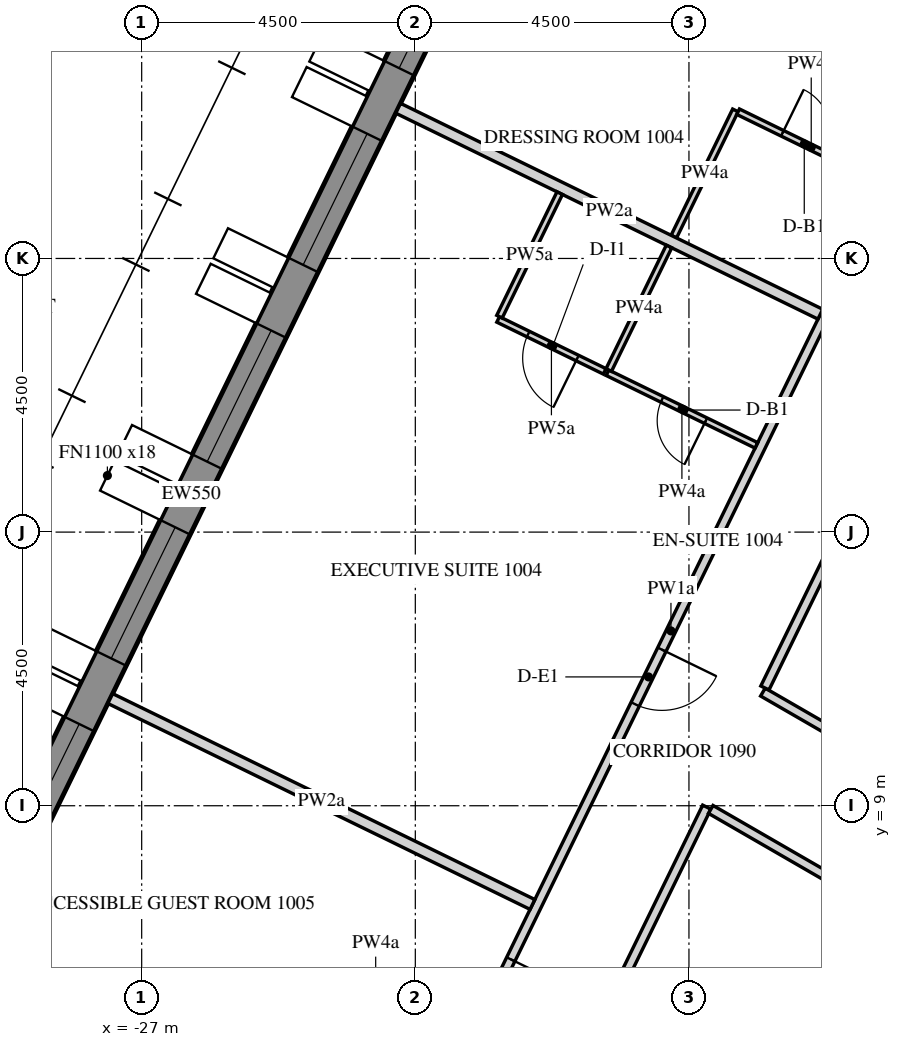
"""IFC4 building model, lengths in metres.
Left out: names, types, materials, properties, quantities, classifications, styles, units other than length and angle.
Written with IfcOpenShell. Run it as: python <this file> out.ifc"""

import sys

from ifc_helpers import new_model, si_unit, direction, frame, frame_2d, origin, place, context, subcontext, project, spatial, polyline, rectangle, outline, extrude, element, fill, save


model = new_model("IFC4")
c1 = context("Model", 3, precision=1e-05, world=origin(), true_north=direction((0.0, 1.0)))
c2 = subcontext(c1, "Body", "Model", "MODEL_VIEW")
j1 = project(units=[si_unit("LENGTHUNIT", "METRE"), si_unit("PLANEANGLEUNIT", "RADIAN")], contexts=[c1])
p1 = place(None, origin())
s1 = spatial("IfcSite", under=j1, at=p1, CompositionType="ELEMENT")
p2 = place(p1, origin())
s2 = spatial("IfcBuilding", under=s1, at=p2, CompositionType="ELEMENT")
p3 = place(p2, frame((0.0, 0.0, 135.0)))
s3 = spatial("IfcBuildingStorey", under=s2, at=p3, CompositionType="ELEMENT", Elevation=135.0)
p4 = place(p3, frame((-19.595, 27.633, -0.15), z_axis=(0.0, 0.0, 1.0), x_axis=(-0.438368285794, -0.898795441694, 0.0)))
e1 = element("IfcWall", 1, at=p4, inside=s3, PredefinedType="SOLIDWALL", context=c2, shape_type="SweptSolid", body=[
    extrude(outline(polyline([(-0.026, -0.275), (30.093, -0.275), (30.048, 0.275), (0.026, 0.275), (-0.026, -0.275)])), origin(), (0.0, 0.0, 1.0), 3.9),
])
p5 = place(p4, frame((1.236, 0.0, 1.05)))
e2 = element("IfcOpeningElement", 2, at=p5, cuts=e1, PredefinedType="OPENING", context=c2, shape_type="SweptSolid", body=[
    extrude(rectangle(XDim=2.4, YDim=2.4, at=frame_2d((1.2, 1.2))), frame((0.0, 0.285, 0.0), z_axis=(0.0, -1.0, 0.0), x_axis=(1.0, 0.0, 0.0)), (0.0, 0.0, 1.0), 0.57),
])
p6 = place(p4, frame((4.835, 0.0, 1.05)))
e3 = element("IfcOpeningElement", 3, at=p6, cuts=e1, PredefinedType="OPENING", context=c2, shape_type="SweptSolid", body=[
    extrude(rectangle(XDim=2.4, YDim=2.4, at=frame_2d((1.2, 1.2))), frame((0.0, 0.285, 0.0), z_axis=(0.0, -1.0, 0.0), x_axis=(1.0, 0.0, 0.0)), (0.0, 0.0, 1.0), 0.57),
])
p7 = place(p4, frame((8.436, 0.0, 1.05)))
e4 = element("IfcOpeningElement", 4, at=p7, cuts=e1, PredefinedType="OPENING", context=c2, shape_type="SweptSolid", body=[
    extrude(rectangle(XDim=2.4, YDim=2.4, at=frame_2d((1.2, 1.2))), frame((0.0, 0.285, 0.0), z_axis=(0.0, -1.0, 0.0), x_axis=(1.0, 0.0, 0.0)), (0.0, 0.0, 1.0), 0.57),
])
p8 = place(p4, frame((12.035, 0.0, 1.05)))
e5 = element("IfcOpeningElement", 5, at=p8, cuts=e1, PredefinedType="OPENING", context=c2, shape_type="SweptSolid", body=[
    extrude(rectangle(XDim=2.4, YDim=2.4, at=frame_2d((1.2, 1.2))), frame((0.0, 0.285, 0.0), z_axis=(0.0, -1.0, 0.0), x_axis=(1.0, 0.0, 0.0)), (0.0, 0.0, 1.0), 0.57),
])
p9 = place(p4, frame((15.635, 0.0, 1.05)))
e6 = element("IfcOpeningElement", 6, at=p9, cuts=e1, PredefinedType="OPENING", context=c2, shape_type="SweptSolid", body=[
    extrude(rectangle(XDim=2.4, YDim=2.4, at=frame_2d((1.2, 1.2))), frame((0.0, 0.285, 0.0), z_axis=(0.0, -1.0, 0.0), x_axis=(1.0, 0.0, 0.0)), (0.0, 0.0, 1.0), 0.57),
])
p10 = place(p4, frame((19.236, 0.0, 1.05)))
e7 = element("IfcOpeningElement", 7, at=p10, cuts=e1, PredefinedType="OPENING", context=c2, shape_type="SweptSolid", body=[
    extrude(rectangle(XDim=2.4, YDim=2.4, at=frame_2d((1.2, 1.2))), frame((0.0, 0.285, 0.0), z_axis=(0.0, -1.0, 0.0), x_axis=(1.0, 0.0, 0.0)), (0.0, 0.0, 1.0), 0.57),
])
p11 = place(p4, frame((22.835, 0.0, 1.05)))
e8 = element("IfcOpeningElement", 8, at=p11, cuts=e1, PredefinedType="OPENING", context=c2, shape_type="SweptSolid", body=[
    extrude(rectangle(XDim=2.4, YDim=2.4, at=frame_2d((1.2, 1.2))), frame((0.0, 0.285, 0.0), z_axis=(0.0, -1.0, 0.0), x_axis=(1.0, 0.0, 0.0)), (0.0, 0.0, 1.0), 0.57),
])
p12 = place(p4, frame((26.436, 0.0, 1.05)))
e9 = element("IfcOpeningElement", 9, at=p12, cuts=e1, PredefinedType="OPENING", context=c2, shape_type="SweptSolid", body=[
    extrude(rectangle(XDim=2.4, YDim=2.4, at=frame_2d((1.2, 1.2))), frame((0.0, 0.285, 0.0), z_axis=(0.0, -1.0, 0.0), x_axis=(1.0, 0.0, 0.0)), (0.0, 0.0, 1.0), 0.57),
])
p13 = place(p3, frame((-7.91, 13.7, -0.15), z_axis=(0.0, 0.0, 1.0), x_axis=(-0.499999880136, -0.866025472988, 0.0)))
e10 = element("IfcWall", 10, at=p13, inside=s3, PredefinedType="SHEAR", context=c2, shape_type="SweptSolid", body=[
    extrude(outline(polyline([(-0.173, -0.3), (15.993, -0.3), (15.646, 0.3), (0.173, 0.3), (-0.173, -0.3)])), origin(), (0.0, 0.0, 1.0), 3.9),
])
p14 = place(p13, frame((7.039, 0.0, 0.15)))
e11 = element("IfcOpeningElement", 11, at=p14, cuts=e10, PredefinedType="OPENING", context=c2, shape_type="SweptSolid", body=[
    extrude(rectangle(XDim=1.8, YDim=2.4, at=frame_2d((0.9, 1.2))), frame((0.0, 0.31, 0.0), z_axis=(0.0, -1.0, 0.0), x_axis=(1.0, 0.0, 0.0)), (0.0, 0.0, 1.0), 0.62),
])
p15 = place(p3, frame((-13.565, 21.575, 0.0), z_axis=(0.0, 0.0, 1.0), x_axis=(-0.438378393111, -0.898790511996, 0.0)))
e12 = element("IfcWall", 12, at=p15, inside=s3, PredefinedType="PARTITIONING", context=c2, shape_type="SweptSolid", body=[
    extrude(rectangle(XDim=21.584, YDim=0.15, at=frame_2d((10.792, 0.0))), origin(), (0.0, 0.0, 1.0), 2.838),
])
p16 = place(p15, frame((0.775, 0.0, 0.0)))
e13 = element("IfcOpeningElement", 13, at=p16, cuts=e12, PredefinedType="OPENING", context=c2, shape_type="SweptSolid", body=[
    extrude(rectangle(XDim=1.0, YDim=2.1, at=frame_2d((0.5, 1.05))), frame((0.0, 0.085, 0.0), z_axis=(0.0, -1.0, 0.0), x_axis=(1.0, 0.0, 0.0)), (0.0, 0.0, 1.0), 0.17),
])
p17 = place(p15, frame((11.134, 0.0, 0.0)))
e14 = element("IfcOpeningElement", 14, at=p17, cuts=e12, PredefinedType="OPENING", context=c2, shape_type="SweptSolid", body=[
    extrude(rectangle(XDim=1.0, YDim=2.1, at=frame_2d((0.5, 1.05))), frame((0.0, 0.085, 0.0), z_axis=(0.0, -1.0, 0.0), x_axis=(1.0, 0.0, 0.0)), (0.0, 0.0, 1.0), 0.17),
])
p18 = place(p15, frame((16.801, 0.0, 0.0)))
e15 = element("IfcOpeningElement", 15, at=p18, cuts=e12, PredefinedType="OPENING", context=c2, shape_type="SweptSolid", body=[
    extrude(rectangle(XDim=1.0, YDim=2.1, at=frame_2d((0.5, 1.05))), frame((0.0, 0.085, 0.0), z_axis=(0.0, -1.0, 0.0), x_axis=(1.0, 0.0, 0.0)), (0.0, 0.0, 1.0), 0.17),
])
p19 = place(p3, frame((-11.614, 7.884, 0.0), z_axis=(0.0, 0.0, 1.0), x_axis=(-0.866017375886, 0.50001390447, 0.0)))
e16 = element("IfcWall", 16, at=p19, inside=s3, PredefinedType="PARTITIONING", context=c2, shape_type="SweptSolid", body=[
    extrude(rectangle(XDim=5.97, YDim=0.15, at=frame_2d((2.985, 0.0))), origin(), (0.0, 0.0, 1.0), 2.838),
])
p20 = place(p3, frame((-16.751, 10.937, 0.0), z_axis=(0.0, 0.0, 1.0), x_axis=(0.438378523504, 0.898790448397, 0.0)))
e17 = element("IfcWall", 17, at=p20, inside=s3, PredefinedType="PARTITIONING", context=c2, shape_type="SweptSolid", body=[
    extrude(rectangle(XDim=9.917, YDim=0.15, at=frame_2d((4.958, 0.0))), origin(), (0.0, 0.0, 1.0), 2.838),
])
p21 = place(p3, frame((-21.885, 0.41, 0.0), z_axis=(0.0, 0.0, 1.0), x_axis=(0.43837064471, 0.898794291179, 0.0)))
e18 = element("IfcWall", 18, at=p21, inside=s3, PredefinedType="PARTITIONING", context=c2, shape_type="SweptSolid", body=[
    extrude(rectangle(XDim=9.532, YDim=0.15, at=frame_2d((4.766, 0.0))), origin(), (0.0, 0.0, 1.0), 2.838),
])
p22 = place(p21, frame((4.316, 0.0, 0.0)))
e19 = element("IfcOpeningElement", 19, at=p22, cuts=e18, PredefinedType="OPENING", context=c2, shape_type="SweptSolid", body=[
    extrude(rectangle(XDim=0.9, YDim=2.1, at=frame_2d((0.45, 1.05))), frame((0.0, 0.085, 0.0), z_axis=(0.0, -1.0, 0.0), x_axis=(1.0, 0.0, 0.0)), (0.0, 0.0, 1.0), 0.17),
])
p23 = place(p3, frame((-17.642, 8.94, 0.0), z_axis=(0.0, 0.0, 1.0), x_axis=(0.866017948234, -0.500012913169, 0.0)))
e20 = element("IfcWall", 20, at=p23, inside=s3, PredefinedType="PARTITIONING", context=c2, shape_type="SweptSolid", body=[
    extrude(rectangle(XDim=5.748, YDim=0.15, at=frame_2d((2.874, 0.0))), origin(), (0.0, 0.0, 1.0), 2.838),
])
p24 = place(p3, frame((-18.249, 18.359, 0.0), z_axis=(0.0, 0.0, 1.0), x_axis=(0.438313261974, 0.898822276303, 0.0)))
e21 = element("IfcWall", 21, at=p24, inside=s3, PredefinedType="PARTITIONING", context=c2, shape_type="SweptSolid", body=[
    extrude(rectangle(XDim=2.31, YDim=0.1, at=frame_2d((1.155, 0.0))), origin(), (0.0, 0.0, 1.0), 2.838),
])
p25 = place(p3, frame((-17.191, 20.413, 0.0), z_axis=(0.0, 0.0, 1.0), x_axis=(0.898800897694, -0.438357099068, 0.0)))
e22 = element("IfcWall", 22, at=p25, inside=s3, PredefinedType="PARTITIONING", context=c2, shape_type="SweptSolid", body=[
    extrude(rectangle(XDim=2.675, YDim=0.1, at=frame_2d((1.337, 0.0))), origin(), (0.0, 0.0, 1.0), 2.838),
])
p26 = place(p25, frame((0.81, 0.0, 0.0)))
e23 = element("IfcOpeningElement", 23, at=p26, cuts=e22, PredefinedType="OPENING", context=c2, shape_type="SweptSolid", body=[
    extrude(rectangle(XDim=0.8, YDim=2.1, at=frame_2d((0.4, 1.05))), frame((0.0, 0.06, 0.0), z_axis=(0.0, -1.0, 0.0), x_axis=(1.0, 0.0, 0.0)), (0.0, 0.0, 1.0), 0.12),
])
p27 = place(p3, frame((-22.782, 20.47, 0.0), z_axis=(0.0, 0.0, 1.0), x_axis=(0.898789402655, -0.438380667542, 0.0)))
e24 = element("IfcWall", 24, at=p27, inside=s3, PredefinedType="PARTITIONING", context=c2, shape_type="SweptSolid", body=[
    extrude(rectangle(XDim=7.725, YDim=0.18, at=frame_2d((3.862, 0.0))), origin(), (0.0, 0.0, 1.0), 2.838),
])
p28 = place(p3, frame((-16.891, 14.926, 0.0), z_axis=(0.0, 0.0, 1.0), x_axis=(-0.898791692788, 0.43837597217, 0.0)))
e25 = element("IfcWall", 25, at=p28, inside=s3, PredefinedType="PARTITIONING", context=c2, shape_type="SweptSolid", body=[
    extrude(rectangle(XDim=2.725, YDim=0.1, at=frame_2d((1.363, 0.0))), origin(), (0.0, 0.0, 1.0), 2.838),
])
p29 = place(p28, frame((0.925, 0.0, 0.0)))
e26 = element("IfcOpeningElement", 26, at=p29, cuts=e25, PredefinedType="OPENING", context=c2, shape_type="SweptSolid", body=[
    extrude(rectangle(XDim=0.8, YDim=2.1, at=frame_2d((0.4, 1.05))), frame((0.0, 0.06, 0.0), z_axis=(0.0, -1.0, 0.0), x_axis=(1.0, 0.0, 0.0)), (0.0, 0.0, 1.0), 0.12),
])
p30 = place(p3, frame((-19.385, 16.143, 0.0), z_axis=(0.0, 0.0, 1.0), x_axis=(-0.898815368173, 0.438327427772, 0.0)))
e27 = element("IfcWall", 27, at=p30, inside=s3, PredefinedType="PARTITIONING", context=c2, shape_type="SweptSolid", body=[
    extrude(rectangle(XDim=1.95, YDim=0.1, at=frame_2d((0.975, 0.0))), origin(), (0.0, 0.0, 1.0), 2.838),
])
p31 = place(p30, frame((0.5, 0.0, 0.0)))
e28 = element("IfcOpeningElement", 28, at=p31, cuts=e27, PredefinedType="OPENING", context=c2, shape_type="SweptSolid", body=[
    extrude(rectangle(XDim=0.9, YDim=2.1, at=frame_2d((0.45, 1.05))), frame((0.0, 0.06, 0.0), z_axis=(0.0, -1.0, 0.0), x_axis=(1.0, 0.0, 0.0)), (0.0, 0.0, 1.0), 0.12),
])
p32 = place(p3, frame((-21.116, 17.042, 0.0), z_axis=(0.0, 0.0, 1.0), x_axis=(0.438334246956, 0.898812042613, 0.0)))
e29 = element("IfcWall", 29, at=p32, inside=s3, PredefinedType="PARTITIONING", context=c2, shape_type="SweptSolid", body=[
    extrude(rectangle(XDim=2.26, YDim=0.1, at=frame_2d((1.13, 0.0))), origin(), (0.0, 0.0, 1.0), 2.838),
])
p33 = place(p3, frame((-27.517, 10.763, 0.0), z_axis=(0.0, 0.0, 1.0), x_axis=(0.898789402655, -0.438380667542, 0.0)))
e30 = element("IfcWall", 30, at=p33, inside=s3, PredefinedType="PARTITIONING", context=c2, shape_type="SweptSolid", body=[
    extrude(rectangle(XDim=7.725, YDim=0.18, at=frame_2d((3.862, 0.0))), origin(), (0.0, 0.0, 1.0), 2.838),
])
p34 = place(p3, frame((-18.328, 18.197, 0.0), z_axis=(0.0, 0.0, 1.0), x_axis=(-0.438376807268, -0.898791285477, 0.0)))
e31 = element("IfcWall", 31, at=p34, inside=s3, PredefinedType="PARTITIONING", context=c2, shape_type="SweptSolid", body=[
    extrude(rectangle(XDim=2.26, YDim=0.1, at=frame_2d((1.13, 0.0))), origin(), (0.0, 0.0, 1.0), 2.838),
])
p35 = place(p6, frame((0.0, 0.205, 0.0)))
e32 = element("IfcWindow", 32, at=p35, inside=s3, PartitioningType="DOUBLE_PANEL_VERTICAL", PredefinedType="WINDOW", context=c2, shape_type="SweptSolid", body=[
    extrude(rectangle(XDim=2.4, YDim=2.4, at=frame_2d((1.2, 1.2))), frame((0.0, 0.03, 0.0), z_axis=(0.0, -1.0, 0.0), x_axis=(1.0, 0.0, 0.0)), (0.0, 0.0, 1.0), 0.06),
])
fill(e3, e32)
p36 = place(p7, frame((0.0, 0.205, 0.0)))
e33 = element("IfcWindow", 33, at=p36, inside=s3, PartitioningType="DOUBLE_PANEL_VERTICAL", PredefinedType="WINDOW", context=c2, shape_type="SweptSolid", body=[
    extrude(rectangle(XDim=2.4, YDim=2.4, at=frame_2d((1.2, 1.2))), frame((0.0, 0.03, 0.0), z_axis=(0.0, -1.0, 0.0), x_axis=(1.0, 0.0, 0.0)), (0.0, 0.0, 1.0), 0.06),
])
fill(e4, e33)
p37 = place(p8, frame((0.0, 0.205, 0.0)))
e34 = element("IfcWindow", 34, at=p37, inside=s3, PartitioningType="DOUBLE_PANEL_VERTICAL", PredefinedType="WINDOW", context=c2, shape_type="SweptSolid", body=[
    extrude(rectangle(XDim=2.4, YDim=2.4, at=frame_2d((1.2, 1.2))), frame((0.0, 0.03, 0.0), z_axis=(0.0, -1.0, 0.0), x_axis=(1.0, 0.0, 0.0)), (0.0, 0.0, 1.0), 0.06),
])
fill(e5, e34)
p38 = place(p9, frame((0.0, 0.205, 0.0)))
e35 = element("IfcWindow", 35, at=p38, inside=s3, PartitioningType="DOUBLE_PANEL_VERTICAL", PredefinedType="WINDOW", context=c2, shape_type="SweptSolid", body=[
    extrude(rectangle(XDim=2.4, YDim=2.4, at=frame_2d((1.2, 1.2))), frame((0.0, 0.03, 0.0), z_axis=(0.0, -1.0, 0.0), x_axis=(1.0, 0.0, 0.0)), (0.0, 0.0, 1.0), 0.06),
])
fill(e6, e35)
p39 = place(p10, frame((0.0, 0.205, 0.0)))
e36 = element("IfcWindow", 36, at=p39, inside=s3, PartitioningType="DOUBLE_PANEL_VERTICAL", PredefinedType="WINDOW", context=c2, shape_type="SweptSolid", body=[
    extrude(rectangle(XDim=2.4, YDim=2.4, at=frame_2d((1.2, 1.2))), frame((0.0, 0.03, 0.0), z_axis=(0.0, -1.0, 0.0), x_axis=(1.0, 0.0, 0.0)), (0.0, 0.0, 1.0), 0.06),
])
fill(e7, e36)
p40 = place(p26, origin())
e37 = element("IfcDoor", 37, at=p40, inside=s3, OperationType="SINGLE_SWING_RIGHT", PredefinedType="DOOR", context=c2, shape_type="SweptSolid", body=[
    extrude(rectangle(XDim=0.8, YDim=2.1, at=frame_2d((0.4, 1.05))), frame((0.0, 0.025, 0.0), z_axis=(0.0, -1.0, 0.0), x_axis=(1.0, 0.0, 0.0)), (0.0, 0.0, 1.0), 0.05),
])
fill(e23, e37)
p41 = place(p17, origin())
e38 = element("IfcDoor", 38, at=p41, inside=s3, OperationType="SINGLE_SWING_LEFT", PredefinedType="DOOR", context=c2, shape_type="SweptSolid", body=[
    extrude(rectangle(XDim=1.0, YDim=2.1, at=frame_2d((0.5, 1.05))), frame((0.0, 0.025, 0.0), z_axis=(0.0, -1.0, 0.0), x_axis=(1.0, 0.0, 0.0)), (0.0, 0.0, 1.0), 0.05),
])
fill(e14, e38)
p42 = place(p29, origin())
e39 = element("IfcDoor", 39, at=p42, inside=s3, OperationType="SINGLE_SWING_RIGHT", PredefinedType="DOOR", context=c2, shape_type="SweptSolid", body=[
    extrude(rectangle(XDim=0.8, YDim=2.1, at=frame_2d((0.4, 1.05))), frame((0.0, 0.025, 0.0), z_axis=(0.0, -1.0, 0.0), x_axis=(1.0, 0.0, 0.0)), (0.0, 0.0, 1.0), 0.05),
])
fill(e26, e39)
p43 = place(p31, origin())
e40 = element("IfcDoor", 40, at=p43, inside=s3, OperationType="SINGLE_SWING_LEFT", PredefinedType="DOOR", context=c2, shape_type="SweptSolid", body=[
    extrude(rectangle(XDim=0.9, YDim=2.1, at=frame_2d((0.45, 1.05))), frame((0.0, 0.025, 0.0), z_axis=(0.0, -1.0, 0.0), x_axis=(1.0, 0.0, 0.0)), (0.0, 0.0, 1.0), 0.05),
])
fill(e28, e40)
p44 = place(p18, origin())
e41 = element("IfcDoor", 41, at=p44, inside=s3, OperationType="SINGLE_SWING_RIGHT", PredefinedType="DOOR", context=c2, shape_type="SweptSolid", body=[
    extrude(rectangle(XDim=1.0, YDim=2.1, at=frame_2d((0.5, 1.05))), frame((0.0, 0.025, 0.0), z_axis=(0.0, -1.0, 0.0), x_axis=(1.0, 0.0, 0.0)), (0.0, 0.0, 1.0), 0.05),
])
fill(e15, e41)
save(model, sys.argv[1])
